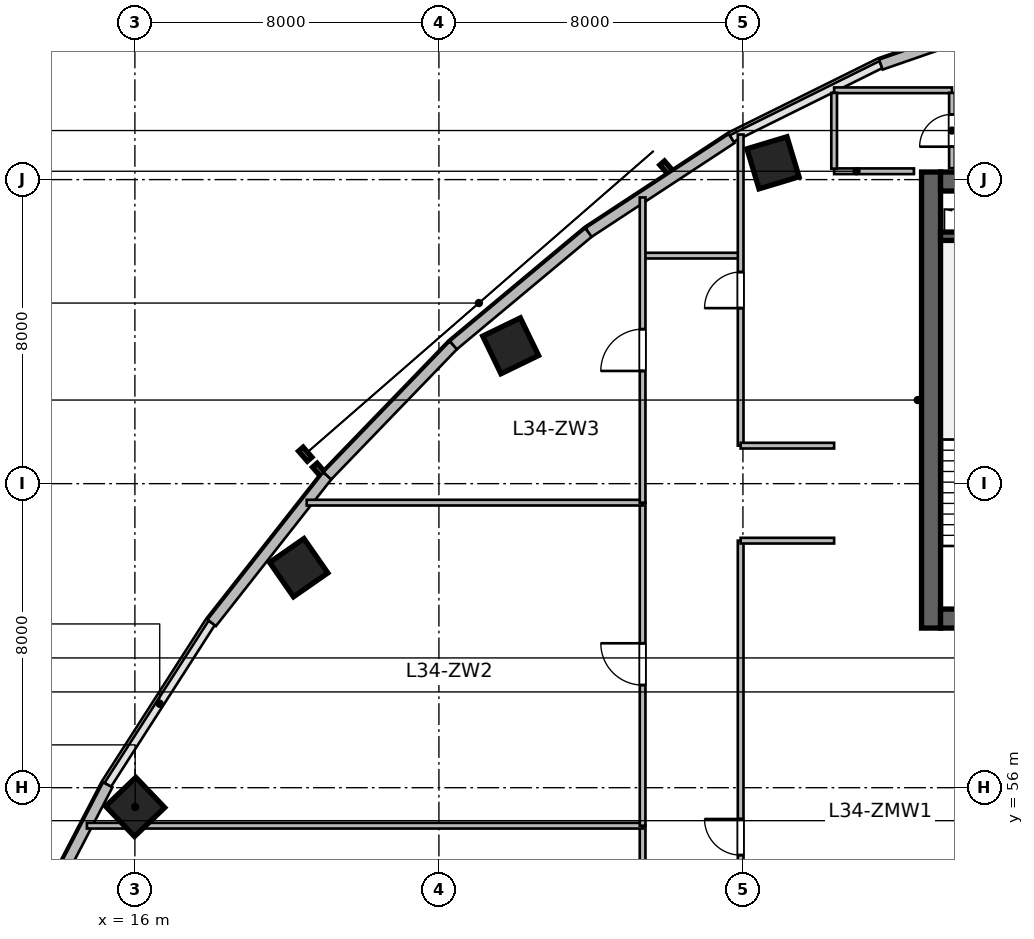
"""IFC4 building model, lengths in metres.
Left out: names, types, materials, properties, quantities, classifications, styles, units other than length and angle.
Written with IfcOpenShell. Run it as: python <this file> out.ifc"""

import sys

from ifc_helpers import new_model, si_unit, direction, frame, frame_2d, origin, origin_2d, place, context, subcontext, project, spatial, rectangle, extrude, source, transform, mapped, element, fill, save


model = new_model("IFC4")
c1 = context("Model", 3, precision=1e-05, world=origin(), true_north=direction((0.0, 1.0)))
c2 = subcontext(c1, "Body", "Model", "MODEL_VIEW")
j1 = project(units=[si_unit("LENGTHUNIT", "METRE"), si_unit("PLANEANGLEUNIT", "RADIAN")], contexts=[c1])
p1 = place(None, origin())
s1 = spatial("IfcSite", under=j1, at=p1, CompositionType="ELEMENT")
p2 = place(p1, origin())
s2 = spatial("IfcBuilding", under=s1, at=p2, CompositionType="ELEMENT")
p3 = place(p2, frame((0.0, 0.0, 142.8)))
s3 = spatial("IfcBuildingStorey", under=s2, at=p3, CompositionType="ELEMENT", Elevation=142.8)
m1 = source(origin(), c2, "Body", "SweptSolid", [
    extrude(rectangle(XDim=12.0, YDim=0.5, at=frame_2d((6.0, 0.0))), origin(), (0.0, 0.0, 1.0), 3.9),
])
p4 = place(p3, frame((36.95, 60.2, 0.0), z_axis=(0.0, 0.0, 1.0), x_axis=(0.0, 1.0, 0.0)))
e1 = element("IfcWall", 1, at=p4, inside=s3, PredefinedType="SHEAR", context=c2, shape_type="MappedRepresentation", body=[
    mapped(m1, transform((0.0, 0.0, 0.0), scale=1.0)),
])
m2 = source(origin(), c2, "Body", "SweptSolid", [
    extrude(rectangle(XDim=21.6, YDim=0.5, at=frame_2d((10.8, 0.0))), origin(), (0.0, 0.0, 1.0), 3.9),
])
p5 = place(p3, frame((37.2, 60.45, 0.0), z_axis=(0.0, 0.0, 1.0), x_axis=(1.0, 0.0, 0.0)))
e2 = element("IfcWall", 2, at=p5, inside=s3, PredefinedType="SHEAR", context=c2, shape_type="MappedRepresentation", body=[
    mapped(m2, transform((0.0, 0.0, 0.0), scale=1.0)),
])
p6 = place(p5, frame((1.1, 0.0, 0.0)))
e3 = element("IfcOpeningElement", 3, at=p6, cuts=e2, PredefinedType="OPENING", context=c2, shape_type="SweptSolid", body=[
    extrude(rectangle(XDim=1.15, YDim=2.15, at=frame_2d((0.575, 1.075))), frame((0.0, 0.26, 0.0), z_axis=(0.0, -1.0, 0.0), x_axis=(1.0, 0.0, 0.0)), (0.0, 0.0, 1.0), 0.52),
])
p7 = place(p5, frame((19.5, 0.0, 0.0)))
e4 = element("IfcOpeningElement", 4, at=p7, cuts=e2, PredefinedType="OPENING", context=c2, shape_type="SweptSolid", body=[
    extrude(rectangle(XDim=0.9, YDim=2.1, at=frame_2d((0.45, 1.05))), frame((0.0, 0.26, 0.0), z_axis=(0.0, -1.0, 0.0), x_axis=(1.0, 0.0, 0.0)), (0.0, 0.0, 1.0), 0.52),
])
p8 = place(p5, frame((12.02, 0.0, 0.0)))
e5 = element("IfcOpeningElement", 5, at=p8, cuts=e2, PredefinedType="OPENING", context=c2, shape_type="SweptSolid", body=[
    extrude(rectangle(XDim=1.6, YDim=2.15, at=frame_2d((0.8, 1.075))), frame((0.0, 0.26, 0.0), z_axis=(0.0, -1.0, 0.0), x_axis=(1.0, 0.0, 0.0)), (0.0, 0.0, 1.0), 0.52),
])
p9 = place(p3, frame((37.2, 71.95, 0.0), z_axis=(0.0, 0.0, 1.0), x_axis=(1.0, 0.0, 0.0)))
e6 = element("IfcWall", 6, at=p9, inside=s3, PredefinedType="SHEAR", context=c2, shape_type="MappedRepresentation", body=[
    mapped(m2, transform((0.0, 0.0, 0.0), scale=1.0)),
])
p10 = place(p9, frame((1.2, 0.0, 0.0)))
e7 = element("IfcOpeningElement", 7, at=p10, cuts=e6, PredefinedType="OPENING", context=c2, shape_type="SweptSolid", body=[
    extrude(rectangle(XDim=0.9, YDim=2.1, at=frame_2d((0.45, 1.05))), frame((0.0, 0.26, 0.0), z_axis=(0.0, -1.0, 0.0), x_axis=(1.0, 0.0, 0.0)), (0.0, 0.0, 1.0), 0.52),
])
p11 = place(p9, frame((14.7, 0.0, 0.0)))
e8 = element("IfcOpeningElement", 8, at=p11, cuts=e6, PredefinedType="OPENING", context=c2, shape_type="SweptSolid", body=[
    extrude(rectangle(XDim=1.2, YDim=2.15, at=frame_2d((0.6, 1.075))), frame((0.0, 0.26, 0.0), z_axis=(0.0, -1.0, 0.0), x_axis=(1.0, 0.0, 0.0)), (0.0, 0.0, 1.0), 0.52),
])
p12 = place(p9, frame((4.15, 0.0, 0.0)))
e9 = element("IfcOpeningElement", 9, at=p12, cuts=e6, PredefinedType="OPENING", context=c2, shape_type="SweptSolid", body=[
    extrude(rectangle(XDim=1.3, YDim=2.15, at=frame_2d((0.65, 1.075))), frame((0.0, 0.26, 0.0), z_axis=(0.0, -1.0, 0.0), x_axis=(1.0, 0.0, 0.0)), (0.0, 0.0, 1.0), 0.52),
])
p13 = place(p9, frame((6.76, 0.0, 0.0)))
e10 = element("IfcOpeningElement", 10, at=p13, cuts=e6, PredefinedType="OPENING", context=c2, shape_type="SweptSolid", body=[
    extrude(rectangle(XDim=0.85, YDim=2.1, at=frame_2d((0.425, 1.05))), frame((0.0, 0.26, 0.0), z_axis=(0.0, -1.0, 0.0), x_axis=(1.0, 0.0, 0.0)), (0.0, 0.0, 1.0), 0.52),
])
p14 = place(p9, frame((8.76, 0.0, 0.0)))
e11 = element("IfcOpeningElement", 11, at=p14, cuts=e6, PredefinedType="OPENING", context=c2, shape_type="SweptSolid", body=[
    extrude(rectangle(XDim=0.85, YDim=2.1, at=frame_2d((0.425, 1.05))), frame((0.0, 0.26, 0.0), z_axis=(0.0, -1.0, 0.0), x_axis=(1.0, 0.0, 0.0)), (0.0, 0.0, 1.0), 0.52),
])
p15 = place(p9, frame((10.725, 0.0, 0.0)))
e12 = element("IfcOpeningElement", 12, at=p15, cuts=e6, PredefinedType="OPENING", context=c2, shape_type="SweptSolid", body=[
    extrude(rectangle(XDim=0.85, YDim=2.1, at=frame_2d((0.425, 1.05))), frame((0.0, 0.26, 0.0), z_axis=(0.0, -1.0, 0.0), x_axis=(1.0, 0.0, 0.0)), (0.0, 0.0, 1.0), 0.52),
])
m3 = source(origin(), c2, "Body", "SweptSolid", [
    extrude(rectangle(XDim=3.27, YDim=0.22, at=frame_2d((1.635, 0.0))), origin(), (0.0, 0.0, 1.0), 3.9),
])
p16 = place(p3, frame((37.2, 70.51, 0.0), z_axis=(0.0, 0.0, 1.0), x_axis=(1.0, 0.0, 0.0)))
e13 = element("IfcWall", 13, at=p16, inside=s3, PredefinedType="SHEAR", context=c2, shape_type="MappedRepresentation", body=[
    mapped(m3, transform((0.0, 0.0, 0.0), scale=1.0)),
])
m4 = source(origin(), c2, "Body", "SweptSolid", [
    extrude(rectangle(XDim=1.1, YDim=1.1, at=origin_2d()), origin(), (0.0, 0.0, 1.0), 3.9),
])
for number, where, z_axis, x_axis in (
    (14, (16.007, 55.494, 0.0), (0.0, 0.0, 1.0), (-0.691, 0.723, 0.0)),
    (15, (20.311, 61.789, 0.0), (0.0, 0.0, 1.0), (-0.571, 0.821, 0.0)),
    (16, (25.888, 67.627, 0.0), (0.0, 0.0, 1.0), (-0.436, 0.9, 0.0)),
    (17, (32.791, 72.442, 0.0), (0.0, 0.0, 1.0), (-0.289, 0.957, 0.0)),
):
    element("IfcColumn", number, at=place(p3, frame(where, z_axis=z_axis, x_axis=x_axis)), inside=s3, PredefinedType="COLUMN", context=c2, shape_type="MappedRepresentation", body=[
        mapped(m4, transform((0.0, 0.0, 0.0), scale=1.0)),
    ])
m5 = source(origin(), c2, "Body", "SweptSolid", [
    extrude(rectangle(XDim=5.171, YDim=0.28, at=frame_2d((2.585, 0.0))), origin(), (0.0, 0.0, 1.0), 3.65),
])
p17 = place(p3, frame((12.898, 51.489, 0.0), z_axis=(0.0, 0.0, 1.0), x_axis=(0.461752581363, 0.887008767491, 0.0)))
e18 = element("IfcWall", 18, at=p17, inside=s3, PredefinedType="SOLIDWALL", context=c2, shape_type="MappedRepresentation", body=[
    mapped(m5, transform((0.0, 0.0, 0.0), scale=1.0)),
])
p18 = place(p17, frame((0.193, 0.0, 0.95)))
e19 = element("IfcOpeningElement", 19, at=p18, cuts=e18, PredefinedType="OPENING", context=c2, shape_type="SweptSolid", body=[
    extrude(rectangle(XDim=2.2, YDim=2.1, at=frame_2d((1.1, 1.05))), frame((0.0, 0.15, 0.0), z_axis=(0.0, -1.0, 0.0), x_axis=(1.0, 0.0, 0.0)), (0.0, 0.0, 1.0), 0.3),
])
m6 = source(origin(), c2, "Body", "SweptSolid", [
    extrude(rectangle(XDim=4.922, YDim=0.28, at=frame_2d((2.461, 0.0))), origin(), (0.0, 0.0, 1.0), 3.65),
])
p19 = place(p3, frame((18.021, 60.338, 0.0), z_axis=(0.0, 0.0, 1.0), x_axis=(0.61817639101, 0.786039407153, 0.0)))
e20 = element("IfcWall", 20, at=p19, inside=s3, PredefinedType="SOLIDWALL", context=c2, shape_type="MappedRepresentation", body=[
    mapped(m6, transform((0.0, 0.0, 0.0), scale=1.0)),
])
m7 = source(origin(), c2, "Body", "SweptSolid", [
    extrude(rectangle(XDim=4.776, YDim=0.28, at=frame_2d((2.388, 0.0))), origin(), (0.0, 0.0, 1.0), 3.65),
])
p20 = place(p3, frame((21.064, 64.206, 0.0), z_axis=(0.0, 0.0, 1.0), x_axis=(0.694601811851, 0.719394414055, 0.0)))
e21 = element("IfcWall", 21, at=p20, inside=s3, PredefinedType="SOLIDWALL", context=c2, shape_type="MappedRepresentation", body=[
    mapped(m7, transform((0.0, 0.0, 0.0), scale=1.0)),
])
m8 = source(origin(), c2, "Body", "SweptSolid", [
    extrude(rectangle(XDim=4.634, YDim=0.28, at=frame_2d((2.317, 0.0))), origin(), (0.0, 0.0, 1.0), 3.65),
])
p21 = place(p3, frame((24.381, 67.642, 0.0), z_axis=(0.0, 0.0, 1.0), x_axis=(0.767910229096, 0.640557475993, 0.0)))
e22 = element("IfcWall", 22, at=p21, inside=s3, PredefinedType="SOLIDWALL", context=c2, shape_type="MappedRepresentation", body=[
    mapped(m8, transform((0.0, 0.0, 0.0), scale=1.0)),
])
m9 = source(origin(), c2, "Body", "SweptSolid", [
    extrude(rectangle(XDim=4.501, YDim=0.28, at=frame_2d((2.25, 0.0))), origin(), (0.0, 0.0, 1.0), 3.65),
])
p22 = place(p3, frame((27.939, 70.61, 0.0), z_axis=(0.0, 0.0, 1.0), x_axis=(0.835984920737, 0.548752414391, 0.0)))
e23 = element("IfcWall", 23, at=p22, inside=s3, PredefinedType="SOLIDWALL", context=c2, shape_type="MappedRepresentation", body=[
    mapped(m9, transform((0.0, 0.0, 0.0), scale=1.0)),
])
m10 = source(origin(), c2, "Body", "SweptSolid", [
    extrude(rectangle(XDim=4.29, YDim=0.28, at=frame_2d((2.145, 0.0))), origin(), (0.0, 0.0, 1.0), 3.65),
])
p23 = place(p3, frame((35.63, 75.027, 0.0), z_axis=(0.0, 0.0, 1.0), x_axis=(0.944883859218, 0.3274057003, 0.0)))
e24 = element("IfcWall", 24, at=p23, inside=s3, PredefinedType="SOLIDWALL", context=c2, shape_type="MappedRepresentation", body=[
    mapped(m10, transform((0.0, 0.0, 0.0), scale=1.0)),
])
m11 = source(origin(), c2, "Body", "SweptSolid", [
    extrude(rectangle(XDim=2.1, YDim=0.15, at=frame_2d((1.05, 0.0))), origin(), (0.0, 0.0, 1.0), 3.65),
])
p24 = place(p3, frame((34.4, 72.22, 0.0), z_axis=(0.0, 0.0, 1.0), x_axis=(1.0, 0.0, 0.0)))
e25 = element("IfcWall", 25, at=p24, inside=s3, PredefinedType="PARTITIONING", context=c2, shape_type="MappedRepresentation", body=[
    mapped(m11, transform((0.0, 0.0, 0.0), scale=1.0)),
])
m12 = source(origin(), c2, "Body", "SweptSolid", [
    extrude(rectangle(XDim=3.1, YDim=0.15, at=frame_2d((1.55, 0.0))), origin(), (0.0, 0.0, 1.0), 3.022),
])
p25 = place(p3, frame((34.4, 74.35, 0.0), z_axis=(0.0, 0.0, 1.0), x_axis=(1.0, 0.0, 0.0)))
e26 = element("IfcWall", 26, at=p25, inside=s3, PredefinedType="PARTITIONING", context=c2, shape_type="MappedRepresentation", body=[
    mapped(m12, transform((0.0, 0.0, 0.0), scale=1.0)),
])
m13 = source(origin(), c2, "Body", "SweptSolid", [
    extrude(rectangle(XDim=1.995, YDim=0.15, at=frame_2d((0.998, 0.0))), origin(), (0.0, 0.0, 1.0), 3.65),
])
p26 = place(p3, frame((34.4, 72.288, 0.0), z_axis=(0.0, 0.0, 1.0), x_axis=(0.0, 1.0, 0.0)))
e27 = element("IfcWall", 27, at=p26, inside=s3, PredefinedType="PARTITIONING", context=c2, shape_type="MappedRepresentation", body=[
    mapped(m13, transform((0.0, 0.0, 0.0), scale=1.0)),
])
m14 = source(origin(), c2, "Body", "SweptSolid", [
    extrude(rectangle(XDim=1.982, YDim=0.15, at=frame_2d((0.991, 0.0))), origin(), (0.0, 0.0, 1.0), 3.65),
])
p27 = place(p3, frame((37.5, 72.3, 0.0), z_axis=(0.0, 0.0, 1.0), x_axis=(0.0, 1.0, 0.0)))
e28 = element("IfcWall", 28, at=p27, inside=s3, PredefinedType="PARTITIONING", context=c2, shape_type="MappedRepresentation", body=[
    mapped(m14, transform((0.0, 0.0, 0.0), scale=1.0)),
])
p28 = place(p27, frame((0.566, 0.0, 0.0)))
e29 = element("IfcOpeningElement", 29, at=p28, cuts=e28, PredefinedType="OPENING", context=c2, shape_type="SweptSolid", body=[
    extrude(rectangle(XDim=0.85, YDim=2.1, at=frame_2d((0.425, 1.05))), frame((0.0, 0.085, 0.0), z_axis=(0.0, -1.0, 0.0), x_axis=(1.0, 0.0, 0.0)), (0.0, 0.0, 1.0), 0.17),
])
m15 = source(origin(), c2, "Body", "SweptSolid", [
    extrude(rectangle(XDim=2.5, YDim=0.15, at=frame_2d((1.25, 0.0))), origin(), (0.0, 0.0, 1.0), 3.65),
])
p29 = place(p3, frame((29.4, 70.0, 0.0), z_axis=(0.0, 0.0, 1.0), x_axis=(1.0, 0.0, 0.0)))
e30 = element("IfcWall", 30, at=p29, inside=s3, PredefinedType="PARTITIONING", context=c2, shape_type="MappedRepresentation", body=[
    mapped(m15, transform((0.0, 0.0, 0.0), scale=1.0)),
])
m16 = source(origin(), c2, "Body", "SweptSolid", [
    extrude(rectangle(XDim=11.612, YDim=0.15, at=frame_2d((5.806, 0.0))), origin(), (0.0, 0.0, 1.0), 2.942),
])
p30 = place(p3, frame((29.36, 43.388, 0.0), z_axis=(0.0, 0.0, 1.0), x_axis=(0.0, 1.0, 0.0)))
e31 = element("IfcWall", 31, at=p30, inside=s3, PredefinedType="PARTITIONING", context=c2, shape_type="MappedRepresentation", body=[
    mapped(m16, transform((0.0, 0.0, 0.0), scale=1.0)),
])
p31 = place(p30, frame((6.962, 0.0, 0.0)))
e32 = element("IfcOpeningElement", 32, at=p31, cuts=e31, PredefinedType="OPENING", context=c2, shape_type="SweptSolid", body=[
    extrude(rectangle(XDim=1.1, YDim=2.15, at=frame_2d((0.55, 1.075))), frame((0.0, 0.085, 0.0), z_axis=(0.0, -1.0, 0.0), x_axis=(1.0, 0.0, 0.0)), (0.0, 0.0, 1.0), 0.17),
])
m17 = source(origin(), c2, "Body", "SweptSolid", [
    extrude(rectangle(XDim=14.623, YDim=0.15, at=frame_2d((7.312, 0.0))), origin(), (0.0, 0.0, 1.0), 3.65),
])
p32 = place(p3, frame((14.737, 55.0, 0.0), z_axis=(0.0, 0.0, 1.0), x_axis=(1.0, 0.0, 0.0)))
e33 = element("IfcWall", 33, at=p32, inside=s3, PredefinedType="PARTITIONING", context=c2, shape_type="MappedRepresentation", body=[
    mapped(m17, transform((0.0, 0.0, 0.0), scale=1.0)),
])
m18 = source(origin(), c2, "Body", "SweptSolid", [
    extrude(rectangle(XDim=8.5, YDim=0.15, at=frame_2d((4.25, 0.0))), origin(), (0.0, 0.0, 1.0), 2.942),
])
p33 = place(p3, frame((29.36, 55.0, 0.0), z_axis=(0.0, 0.0, 1.0), x_axis=(0.0, 1.0, 0.0)))
e34 = element("IfcWall", 34, at=p33, inside=s3, PredefinedType="PARTITIONING", context=c2, shape_type="MappedRepresentation", body=[
    mapped(m18, transform((0.0, 0.0, 0.0), scale=1.0)),
])
p34 = place(p33, frame((3.7, 0.0, 0.0)))
e35 = element("IfcOpeningElement", 35, at=p34, cuts=e34, PredefinedType="OPENING", context=c2, shape_type="SweptSolid", body=[
    extrude(rectangle(XDim=1.1, YDim=2.15, at=frame_2d((0.55, 1.075))), frame((0.0, 0.085, 0.0), z_axis=(0.0, -1.0, 0.0), x_axis=(1.0, 0.0, 0.0)), (0.0, 0.0, 1.0), 0.17),
])
m19 = source(origin(), c2, "Body", "SweptSolid", [
    extrude(rectangle(XDim=8.839, YDim=0.15, at=frame_2d((4.419, 0.0))), origin(), (0.0, 0.0, 1.0), 3.65),
])
p35 = place(p3, frame((20.521, 63.5, 0.0), z_axis=(0.0, 0.0, 1.0), x_axis=(1.0, 0.0, 0.0)))
e36 = element("IfcWall", 36, at=p35, inside=s3, PredefinedType="PARTITIONING", context=c2, shape_type="MappedRepresentation", body=[
    mapped(m19, transform((0.0, 0.0, 0.0), scale=1.0)),
])
m20 = source(origin(), c2, "Body", "SweptSolid", [
    extrude(rectangle(XDim=8.031, YDim=0.15, at=frame_2d((4.015, 0.0))), origin(), (0.0, 0.0, 1.0), 3.65),
])
p36 = place(p3, frame((29.36, 63.5, 0.0), z_axis=(0.0, 0.0, 1.0), x_axis=(0.0, 1.0, 0.0)))
e37 = element("IfcWall", 37, at=p36, inside=s3, PredefinedType="PARTITIONING", context=c2, shape_type="MappedRepresentation", body=[
    mapped(m20, transform((0.0, 0.0, 0.0), scale=1.0)),
])
p37 = place(p36, frame((3.465, 0.0, 0.0)))
e38 = element("IfcOpeningElement", 38, at=p37, cuts=e37, PredefinedType="OPENING", context=c2, shape_type="SweptSolid", body=[
    extrude(rectangle(XDim=1.1, YDim=2.15, at=frame_2d((0.55, 1.075))), frame((0.0, 0.085, 0.0), z_axis=(0.0, -1.0, 0.0), x_axis=(1.0, 0.0, 0.0)), (0.0, 0.0, 1.0), 0.17),
])
m21 = source(origin(), c2, "Body", "SweptSolid", [
    extrude(rectangle(XDim=15.598, YDim=0.15, at=frame_2d((7.799, 0.0))), origin(), (0.0, 0.0, 1.0), 2.942),
])
p38 = place(p3, frame((31.94, 46.902, 0.0), z_axis=(0.0, 0.0, 1.0), x_axis=(0.0, 1.0, 0.0)))
e39 = element("IfcWall", 39, at=p38, inside=s3, PredefinedType="PARTITIONING", context=c2, shape_type="MappedRepresentation", body=[
    mapped(m21, transform((0.0, 0.0, 0.0), scale=1.0)),
])
p39 = place(p38, frame((7.324, 0.0, 0.0)))
e40 = element("IfcOpeningElement", 40, at=p39, cuts=e39, PredefinedType="OPENING", context=c2, shape_type="SweptSolid", body=[
    extrude(rectangle(XDim=0.95, YDim=2.1, at=frame_2d((0.475, 1.05))), frame((0.0, 0.085, 0.0), z_axis=(0.0, -1.0, 0.0), x_axis=(1.0, 0.0, 0.0)), (0.0, 0.0, 1.0), 0.17),
])
m22 = source(origin(), c2, "Body", "SweptSolid", [
    extrude(rectangle(XDim=2.46, YDim=0.15, at=frame_2d((1.23, 0.0))), origin(), (0.0, 0.0, 1.0), 3.65),
])
p40 = place(p3, frame((31.94, 62.5, 0.0), z_axis=(0.0, 0.0, 1.0), x_axis=(1.0, 0.0, 0.0)))
e41 = element("IfcWall", 41, at=p40, inside=s3, PredefinedType="PARTITIONING", context=c2, shape_type="MappedRepresentation", body=[
    mapped(m22, transform((0.0, 0.0, 0.0), scale=1.0)),
])
m23 = source(origin(), c2, "Body", "SweptSolid", [
    extrude(rectangle(XDim=8.187, YDim=0.15, at=frame_2d((4.093, 0.0))), origin(), (0.0, 0.0, 1.0), 3.65),
])
p41 = place(p3, frame((31.94, 65.0, 0.0), z_axis=(0.0, 0.0, 1.0), x_axis=(0.0, 1.0, 0.0)))
e42 = element("IfcWall", 42, at=p41, inside=s3, PredefinedType="PARTITIONING", context=c2, shape_type="MappedRepresentation", body=[
    mapped(m23, transform((0.0, 0.0, 0.0), scale=1.0)),
])
p42 = place(p41, frame((3.618, 0.0, 0.0)))
e43 = element("IfcOpeningElement", 43, at=p42, cuts=e42, PredefinedType="OPENING", context=c2, shape_type="SweptSolid", body=[
    extrude(rectangle(XDim=0.95, YDim=2.1, at=frame_2d((0.475, 1.05))), frame((0.0, 0.085, 0.0), z_axis=(0.0, -1.0, 0.0), x_axis=(1.0, 0.0, 0.0)), (0.0, 0.0, 1.0), 0.17),
])
p43 = place(p3, frame((31.94, 65.0, 0.0), z_axis=(0.0, 0.0, 1.0), x_axis=(1.0, 0.0, 0.0)))
e44 = element("IfcWall", 44, at=p43, inside=s3, PredefinedType="PARTITIONING", context=c2, shape_type="MappedRepresentation", body=[
    mapped(m22, transform((0.0, 0.0, 0.0), scale=1.0)),
])
m24 = source(origin(), c2, "Body", "SweptSolid", [
    extrude(rectangle(XDim=0.85, YDim=2.1, at=frame_2d((0.425, 1.05))), frame((0.0, 0.025, 0.0), z_axis=(0.0, -1.0, 0.0), x_axis=(1.0, 0.0, 0.0)), (0.0, 0.0, 1.0), 0.05),
])
p44 = place(p28, origin())
e45 = element("IfcDoor", 45, at=p44, inside=s3, OperationType="SINGLE_SWING_LEFT", PredefinedType="DOOR", context=c2, shape_type="MappedRepresentation", body=[
    mapped(m24, transform((0.0, 0.0, 0.0), scale=1.0)),
])
fill(e29, e45)
m25 = source(origin(), c2, "Body", "SweptSolid", [
    extrude(rectangle(XDim=1.1, YDim=2.15, at=frame_2d((0.55, 1.075))), frame((0.0, 0.025, 0.0), z_axis=(0.0, -1.0, 0.0), x_axis=(1.0, 0.0, 0.0)), (0.0, 0.0, 1.0), 0.05),
])
p45 = place(p34, origin())
e46 = element("IfcDoor", 46, at=p45, inside=s3, OperationType="SINGLE_SWING_RIGHT", PredefinedType="DOOR", context=c2, shape_type="MappedRepresentation", body=[
    mapped(m25, transform((0.0, 0.0, 0.0), scale=1.0)),
])
fill(e35, e46)
p46 = place(p37, origin())
e47 = element("IfcDoor", 47, at=p46, inside=s3, OperationType="SINGLE_SWING_LEFT", PredefinedType="DOOR", context=c2, shape_type="MappedRepresentation", body=[
    mapped(m25, transform((0.0, 0.0, 0.0), scale=1.0)),
])
fill(e38, e47)
m26 = source(origin(), c2, "Body", "SweptSolid", [
    extrude(rectangle(XDim=0.95, YDim=2.1, at=frame_2d((0.475, 1.05))), frame((0.0, 0.025, 0.0), z_axis=(0.0, -1.0, 0.0), x_axis=(1.0, 0.0, 0.0)), (0.0, 0.0, 1.0), 0.05),
])
p47 = place(p39, origin())
e48 = element("IfcDoor", 48, at=p47, inside=s3, OperationType="SINGLE_SWING_RIGHT", PredefinedType="DOOR", context=c2, shape_type="MappedRepresentation", body=[
    mapped(m26, transform((0.0, 0.0, 0.0), scale=1.0)),
])
fill(e40, e48)
p48 = place(p42, origin())
e49 = element("IfcDoor", 49, at=p48, inside=s3, OperationType="SINGLE_SWING_LEFT", PredefinedType="DOOR", context=c2, shape_type="MappedRepresentation", body=[
    mapped(m26, transform((0.0, 0.0, 0.0), scale=1.0)),
])
fill(e43, e49)
save(model, sys.argv[1])
